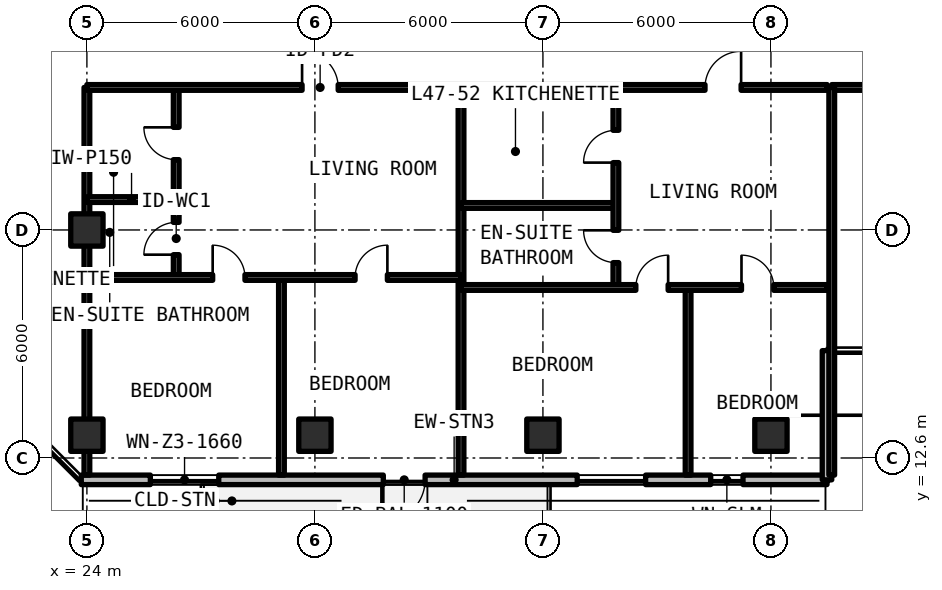
"""IFC4 building model, lengths in metres.
Left out: names, types, materials, properties, quantities, classifications, styles, units other than length and angle.
Written with IfcOpenShell. Run it as: python <this file> out.ifc"""

import sys

from ifc_helpers import new_model, si_unit, direction, frame, frame_2d, origin, origin_2d, place, context, subcontext, project, spatial, rectangle, extrude, element, fill, save


model = new_model("IFC4")
c1 = context("Model", 3, precision=1e-05, world=origin(), true_north=direction((0.0, 1.0)))
c2 = subcontext(c1, "Body", "Model", "MODEL_VIEW")
j1 = project(units=[si_unit("LENGTHUNIT", "METRE"), si_unit("PLANEANGLEUNIT", "RADIAN")], contexts=[c1])
p1 = place(None, origin())
s1 = spatial("IfcSite", under=j1, at=p1, CompositionType="ELEMENT")
p2 = place(p1, origin())
s2 = spatial("IfcBuilding", under=s1, at=p2, CompositionType="ELEMENT")
p3 = place(p2, frame((0.0, 0.0, 169.29)))
s3 = spatial("IfcBuildingStorey", under=s2, at=p3, CompositionType="ELEMENT", Elevation=169.29)
for number, where, z_axis, x_axis in (
    (1, (24.0, 18.6, 0.0), (0.0, 0.0, 1.0), (1.0, 0.0, 0.0)),
    (2, (24.0, 13.2, 0.0), (0.0, 0.0, 1.0), (1.0, 0.0, 0.0)),
    (3, (30.0, 13.2, 0.0), (0.0, 0.0, 1.0), (1.0, 0.0, 0.0)),
    (4, (36.0, 13.2, 0.0), (0.0, 0.0, 1.0), (1.0, 0.0, 0.0)),
    (5, (42.0, 13.2, 0.0), (0.0, 0.0, 1.0), (1.0, 0.0, 0.0)),
):
    element("IfcColumn", number, at=place(p3, frame(where, z_axis=z_axis, x_axis=x_axis)), inside=s3, PredefinedType="COLUMN", context=c2, shape_type="SweptSolid", body=[
        extrude(rectangle(XDim=0.85, YDim=0.85, at=origin_2d()), origin(), (0.0, 0.0, 1.0), 3.63),
    ])
p4 = place(p3, frame((23.852, 12.025, 0.0), z_axis=(0.0, 0.0, 1.0), x_axis=(1.0, 0.0, 0.0)))
e6 = element("IfcWall", 6, at=p4, inside=s3, PredefinedType="SOLIDWALL", context=c2, shape_type="SweptSolid", body=[
    extrude(rectangle(XDim=19.623, YDim=0.25, at=frame_2d((9.812, 0.0))), origin(), (0.0, 0.0, 1.0), 3.35),
])
p5 = place(p4, frame((7.948, 0.0, 0.0)))
e7 = element("IfcOpeningElement", 7, at=p5, cuts=e6, PredefinedType="OPENING", context=c2, shape_type="SweptSolid", body=[
    extrude(rectangle(XDim=1.1, YDim=2.15, at=frame_2d((0.55, 1.075))), frame((0.0, 0.135, 0.0), z_axis=(0.0, -1.0, 0.0), x_axis=(1.0, 0.0, 0.0)), (0.0, 0.0, 1.0), 0.27),
])
p6 = place(p4, frame((1.818, 0.0, 0.78)))
e8 = element("IfcOpeningElement", 8, at=p6, cuts=e6, PredefinedType="OPENING", context=c2, shape_type="SweptSolid", body=[
    extrude(rectangle(XDim=1.8, YDim=1.66, at=frame_2d((0.9, 0.83))), frame((0.0, 0.135, 0.0), z_axis=(0.0, -1.0, 0.0), x_axis=(1.0, 0.0, 0.0)), (0.0, 0.0, 1.0), 0.27),
])
p7 = place(p4, frame((13.051, 0.0, 0.78)))
e9 = element("IfcOpeningElement", 9, at=p7, cuts=e6, PredefinedType="OPENING", context=c2, shape_type="SweptSolid", body=[
    extrude(rectangle(XDim=1.8, YDim=1.66, at=frame_2d((0.9, 0.83))), frame((0.0, 0.135, 0.0), z_axis=(0.0, -1.0, 0.0), x_axis=(1.0, 0.0, 0.0)), (0.0, 0.0, 1.0), 0.27),
])
p8 = place(p4, frame((16.563, 0.0, 0.78)))
e10 = element("IfcOpeningElement", 10, at=p8, cuts=e6, PredefinedType="OPENING", context=c2, shape_type="SweptSolid", body=[
    extrude(rectangle(XDim=0.85, YDim=1.65, at=frame_2d((0.425, 0.825))), frame((0.0, 0.135, 0.0), z_axis=(0.0, -1.0, 0.0), x_axis=(1.0, 0.0, 0.0)), (0.0, 0.0, 1.0), 0.27),
])
p9 = place(p3, frame((43.475, 12.025, 0.0), z_axis=(0.0, 0.0, 1.0), x_axis=(0.0, 1.0, 0.0)))
e11 = element("IfcWall", 11, at=p9, inside=s3, PredefinedType="SOLIDWALL", context=c2, shape_type="SweptSolid", body=[
    extrude(rectangle(XDim=3.4, YDim=0.25, at=frame_2d((1.7, 0.0))), origin(), (0.0, 0.0, 1.0), 3.35),
])
p10 = place(p3, frame((43.6, 22.35, 0.0), z_axis=(0.0, 0.0, 1.0), x_axis=(1.0, 0.0, 0.0)))
e12 = element("IfcWall", 12, at=p10, inside=s3, PredefinedType="SOLIDWALL", context=c2, shape_type="SweptSolid", body=[
    extrude(rectangle(XDim=8.4, YDim=0.15, at=frame_2d((4.2, 0.0))), origin(), (0.0, 0.0, 1.0), 2.57),
])
p11 = place(p10, frame((3.65, 0.0, 0.0)))
e13 = element("IfcOpeningElement", 13, at=p11, cuts=e12, PredefinedType="OPENING", context=c2, shape_type="SweptSolid", body=[
    extrude(rectangle(XDim=1.1, YDim=2.15, at=frame_2d((0.55, 1.075))), frame((0.0, 0.085, 0.0), z_axis=(0.0, -1.0, 0.0), x_axis=(1.0, 0.0, 0.0)), (0.0, 0.0, 1.0), 0.17),
])
for number, where, z_axis, x_axis in (
    (14, (43.6, 12.15, 0.0), (0.0, 0.0, 1.0), (0.0, 1.0, 0.0)),
    (15, (24.0, 12.15, 0.0), (0.0, 0.0, 1.0), (0.0, 1.0, 0.0)),
    (16, (33.845, 12.15, 0.0), (0.0, 0.0, 1.0), (0.0, 1.0, 0.0)),
):
    element("IfcWall", number, at=place(p3, frame(where, z_axis=z_axis, x_axis=x_axis)), inside=s3, PredefinedType="SOLIDWALL", context=c2, shape_type="SweptSolid", body=[
        extrude(rectangle(XDim=10.2, YDim=0.15, at=frame_2d((5.1, 0.0))), origin(), (0.0, 0.0, 1.0), 2.57),
    ])
p12 = place(p3, frame((24.0, 19.4, 0.0), z_axis=(0.0, 0.0, 1.0), x_axis=(1.0, 0.0, 0.0)))
e17 = element("IfcWall", 17, at=p12, inside=s3, PredefinedType="PARTITIONING", context=c2, shape_type="SweptSolid", body=[
    extrude(rectangle(XDim=2.35, YDim=0.15, at=frame_2d((1.175, 0.0))), origin(), (0.0, 0.0, 1.0), 2.57),
])
p13 = place(p3, frame((26.35, 17.35, 0.0), z_axis=(0.0, 0.0, 1.0), x_axis=(0.0, 1.0, 0.0)))
e18 = element("IfcWall", 18, at=p13, inside=s3, PredefinedType="PARTITIONING", context=c2, shape_type="SweptSolid", body=[
    extrude(rectangle(XDim=5.0, YDim=0.15, at=frame_2d((2.5, 0.0))), origin(), (0.0, 0.0, 1.0), 2.57),
])
p14 = place(p13, frame((0.6, 0.0, 0.0)))
e19 = element("IfcOpeningElement", 19, at=p14, cuts=e18, PredefinedType="OPENING", context=c2, shape_type="SweptSolid", body=[
    extrude(rectangle(XDim=0.85, YDim=2.1, at=frame_2d((0.425, 1.05))), frame((0.0, 0.085, 0.0), z_axis=(0.0, -1.0, 0.0), x_axis=(1.0, 0.0, 0.0)), (0.0, 0.0, 1.0), 0.17),
])
p15 = place(p13, frame((3.1, 0.0, 0.0)))
e20 = element("IfcOpeningElement", 20, at=p15, cuts=e18, PredefinedType="OPENING", context=c2, shape_type="SweptSolid", body=[
    extrude(rectangle(XDim=0.85, YDim=2.1, at=frame_2d((0.425, 1.05))), frame((0.0, 0.085, 0.0), z_axis=(0.0, -1.0, 0.0), x_axis=(1.0, 0.0, 0.0)), (0.0, 0.0, 1.0), 0.17),
])
p16 = place(p3, frame((29.119, 12.15, 0.0), z_axis=(0.0, 0.0, 1.0), x_axis=(0.0, 1.0, 0.0)))
e21 = element("IfcWall", 21, at=p16, inside=s3, PredefinedType="PARTITIONING", context=c2, shape_type="SweptSolid", body=[
    extrude(rectangle(XDim=5.2, YDim=0.15, at=frame_2d((2.6, 0.0))), origin(), (0.0, 0.0, 1.0), 2.57),
])
p17 = place(p3, frame((24.0, 17.35, 0.0), z_axis=(0.0, 0.0, 1.0), x_axis=(1.0, 0.0, 0.0)))
e22 = element("IfcWall", 22, at=p17, inside=s3, PredefinedType="PARTITIONING", context=c2, shape_type="SweptSolid", body=[
    extrude(rectangle(XDim=9.845, YDim=0.15, at=frame_2d((4.922, 0.0))), origin(), (0.0, 0.0, 1.0), 2.57),
])
p18 = place(p17, frame((3.31, 0.0, 0.0)))
e23 = element("IfcOpeningElement", 23, at=p18, cuts=e22, PredefinedType="OPENING", context=c2, shape_type="SweptSolid", body=[
    extrude(rectangle(XDim=0.85, YDim=2.1, at=frame_2d((0.425, 1.05))), frame((0.0, 0.085, 0.0), z_axis=(0.0, -1.0, 0.0), x_axis=(1.0, 0.0, 0.0)), (0.0, 0.0, 1.0), 0.17),
])
p19 = place(p17, frame((7.057, 0.0, 0.0)))
e24 = element("IfcOpeningElement", 24, at=p19, cuts=e22, PredefinedType="OPENING", context=c2, shape_type="SweptSolid", body=[
    extrude(rectangle(XDim=0.85, YDim=2.1, at=frame_2d((0.425, 1.05))), frame((0.0, 0.085, 0.0), z_axis=(0.0, -1.0, 0.0), x_axis=(1.0, 0.0, 0.0)), (0.0, 0.0, 1.0), 0.17),
])
p20 = place(p3, frame((24.0, 22.35, 0.0), z_axis=(0.0, 0.0, 1.0), x_axis=(1.0, 0.0, 0.0)))
e25 = element("IfcWall", 25, at=p20, inside=s3, PredefinedType="SOLIDWALL", context=c2, shape_type="SweptSolid", body=[
    extrude(rectangle(XDim=9.845, YDim=0.15, at=frame_2d((4.922, 0.0))), origin(), (0.0, 0.0, 1.0), 2.57),
])
p21 = place(p20, frame((5.662, 0.0, 0.0)))
e26 = element("IfcOpeningElement", 26, at=p21, cuts=e25, PredefinedType="OPENING", context=c2, shape_type="SweptSolid", body=[
    extrude(rectangle(XDim=0.95, YDim=2.15, at=frame_2d((0.475, 1.075))), frame((0.0, 0.085, 0.0), z_axis=(0.0, -1.0, 0.0), x_axis=(1.0, 0.0, 0.0)), (0.0, 0.0, 1.0), 0.17),
])
p22 = place(p3, frame((33.845, 19.245, 0.0), z_axis=(0.0, 0.0, 1.0), x_axis=(1.0, 0.0, 0.0)))
e27 = element("IfcWall", 27, at=p22, inside=s3, PredefinedType="PARTITIONING", context=c2, shape_type="SweptSolid", body=[
    extrude(rectangle(XDim=4.075, YDim=0.15, at=frame_2d((2.038, 0.0))), origin(), (0.0, 0.0, 1.0), 2.57),
])
p23 = place(p3, frame((37.92, 17.087, 0.0), z_axis=(0.0, 0.0, 1.0), x_axis=(0.0, 1.0, 0.0)))
e28 = element("IfcWall", 28, at=p23, inside=s3, PredefinedType="PARTITIONING", context=c2, shape_type="SweptSolid", body=[
    extrude(rectangle(XDim=5.263, YDim=0.15, at=frame_2d((2.632, 0.0))), origin(), (0.0, 0.0, 1.0), 2.57),
])
p24 = place(p23, frame((0.654, 0.0, 0.0)))
e29 = element("IfcOpeningElement", 29, at=p24, cuts=e28, PredefinedType="OPENING", context=c2, shape_type="SweptSolid", body=[
    extrude(rectangle(XDim=0.85, YDim=2.1, at=frame_2d((0.425, 1.05))), frame((0.0, 0.085, 0.0), z_axis=(0.0, -1.0, 0.0), x_axis=(1.0, 0.0, 0.0)), (0.0, 0.0, 1.0), 0.17),
])
p25 = place(p23, frame((3.285, 0.0, 0.0)))
e30 = element("IfcOpeningElement", 30, at=p25, cuts=e28, PredefinedType="OPENING", context=c2, shape_type="SweptSolid", body=[
    extrude(rectangle(XDim=0.85, YDim=2.1, at=frame_2d((0.425, 1.05))), frame((0.0, 0.085, 0.0), z_axis=(0.0, -1.0, 0.0), x_axis=(1.0, 0.0, 0.0)), (0.0, 0.0, 1.0), 0.17),
])
p26 = place(p3, frame((39.82, 12.15, 0.0), z_axis=(0.0, 0.0, 1.0), x_axis=(0.0, 1.0, 0.0)))
e31 = element("IfcWall", 31, at=p26, inside=s3, PredefinedType="PARTITIONING", context=c2, shape_type="SweptSolid", body=[
    extrude(rectangle(XDim=4.937, YDim=0.15, at=frame_2d((2.469, 0.0))), origin(), (0.0, 0.0, 1.0), 2.57),
])
p27 = place(p3, frame((33.845, 17.087, 0.0), z_axis=(0.0, 0.0, 1.0), x_axis=(1.0, 0.0, 0.0)))
e32 = element("IfcWall", 32, at=p27, inside=s3, PredefinedType="PARTITIONING", context=c2, shape_type="SweptSolid", body=[
    extrude(rectangle(XDim=9.635, YDim=0.15, at=frame_2d((4.818, 0.0))), origin(), (0.0, 0.0, 1.0), 2.57),
])
p28 = place(p27, frame((4.6, 0.0, 0.0)))
e33 = element("IfcOpeningElement", 33, at=p28, cuts=e32, PredefinedType="OPENING", context=c2, shape_type="SweptSolid", body=[
    extrude(rectangle(XDim=0.85, YDim=2.1, at=frame_2d((0.425, 1.05))), frame((0.0, 0.085, 0.0), z_axis=(0.0, -1.0, 0.0), x_axis=(1.0, 0.0, 0.0)), (0.0, 0.0, 1.0), 0.17),
])
p29 = place(p27, frame((7.38, 0.0, 0.0)))
e34 = element("IfcOpeningElement", 34, at=p29, cuts=e32, PredefinedType="OPENING", context=c2, shape_type="SweptSolid", body=[
    extrude(rectangle(XDim=0.85, YDim=2.1, at=frame_2d((0.425, 1.05))), frame((0.0, 0.085, 0.0), z_axis=(0.0, -1.0, 0.0), x_axis=(1.0, 0.0, 0.0)), (0.0, 0.0, 1.0), 0.17),
])
p30 = place(p3, frame((33.845, 22.35, 0.0), z_axis=(0.0, 0.0, 1.0), x_axis=(1.0, 0.0, 0.0)))
e35 = element("IfcWall", 35, at=p30, inside=s3, PredefinedType="SOLIDWALL", context=c2, shape_type="SweptSolid", body=[
    extrude(rectangle(XDim=9.635, YDim=0.15, at=frame_2d((4.818, 0.0))), origin(), (0.0, 0.0, 1.0), 2.57),
])
p31 = place(p30, frame((6.42, 0.0, 0.0)))
e36 = element("IfcOpeningElement", 36, at=p31, cuts=e35, PredefinedType="OPENING", context=c2, shape_type="SweptSolid", body=[
    extrude(rectangle(XDim=0.95, YDim=2.15, at=frame_2d((0.475, 1.075))), frame((0.0, 0.085, 0.0), z_axis=(0.0, -1.0, 0.0), x_axis=(1.0, 0.0, 0.0)), (0.0, 0.0, 1.0), 0.17),
])
p32 = place(p5, frame((1.1, 0.0, 0.0), z_axis=(0.0, 0.0, 1.0), x_axis=(-1.0, 0.0, 0.0)))
e37 = element("IfcDoor", 37, at=p32, inside=s3, OperationType="SINGLE_SWING_RIGHT", PredefinedType="DOOR", context=c2, shape_type="SweptSolid", body=[
    extrude(rectangle(XDim=1.1, YDim=2.15, at=frame_2d((0.55, 1.075))), frame((0.0, 0.025, 0.0), z_axis=(0.0, -1.0, 0.0), x_axis=(1.0, 0.0, 0.0)), (0.0, 0.0, 1.0), 0.05),
])
fill(e7, e37)
p33 = place(p6, origin())
e38 = element("IfcWindow", 38, at=p33, inside=s3, PartitioningType="SINGLE_PANEL", PredefinedType="WINDOW", context=c2, shape_type="SweptSolid", body=[
    extrude(rectangle(XDim=1.8, YDim=1.66, at=frame_2d((0.9, 0.83))), frame((0.0, 0.03, 0.0), z_axis=(0.0, -1.0, 0.0), x_axis=(1.0, 0.0, 0.0)), (0.0, 0.0, 1.0), 0.06),
])
fill(e8, e38)
p34 = place(p7, origin())
e39 = element("IfcWindow", 39, at=p34, inside=s3, PartitioningType="SINGLE_PANEL", PredefinedType="WINDOW", context=c2, shape_type="SweptSolid", body=[
    extrude(rectangle(XDim=1.8, YDim=1.66, at=frame_2d((0.9, 0.83))), frame((0.0, 0.03, 0.0), z_axis=(0.0, -1.0, 0.0), x_axis=(1.0, 0.0, 0.0)), (0.0, 0.0, 1.0), 0.06),
])
fill(e9, e39)
p35 = place(p8, origin())
e40 = element("IfcWindow", 40, at=p35, inside=s3, PartitioningType="SINGLE_PANEL", PredefinedType="WINDOW", context=c2, shape_type="SweptSolid", body=[
    extrude(rectangle(XDim=0.85, YDim=1.65, at=frame_2d((0.425, 0.825))), frame((0.0, 0.03, 0.0), z_axis=(0.0, -1.0, 0.0), x_axis=(1.0, 0.0, 0.0)), (0.0, 0.0, 1.0), 0.06),
])
fill(e10, e40)
p36 = place(p14, origin())
e41 = element("IfcDoor", 41, at=p36, inside=s3, OperationType="SINGLE_SWING_LEFT", PredefinedType="DOOR", context=c2, shape_type="SweptSolid", body=[
    extrude(rectangle(XDim=0.85, YDim=2.1, at=frame_2d((0.425, 1.05))), frame((0.0, 0.025, 0.0), z_axis=(0.0, -1.0, 0.0), x_axis=(1.0, 0.0, 0.0)), (0.0, 0.0, 1.0), 0.05),
])
fill(e19, e41)
p37 = place(p15, origin())
e42 = element("IfcDoor", 42, at=p37, inside=s3, OperationType="SINGLE_SWING_RIGHT", PredefinedType="DOOR", context=c2, shape_type="SweptSolid", body=[
    extrude(rectangle(XDim=0.85, YDim=2.1, at=frame_2d((0.425, 1.05))), frame((0.0, 0.025, 0.0), z_axis=(0.0, -1.0, 0.0), x_axis=(1.0, 0.0, 0.0)), (0.0, 0.0, 1.0), 0.05),
])
fill(e20, e42)
p38 = place(p18, origin())
e43 = element("IfcDoor", 43, at=p38, inside=s3, OperationType="SINGLE_SWING_LEFT", PredefinedType="DOOR", context=c2, shape_type="SweptSolid", body=[
    extrude(rectangle(XDim=0.85, YDim=2.1, at=frame_2d((0.425, 1.05))), frame((0.0, 0.025, 0.0), z_axis=(0.0, -1.0, 0.0), x_axis=(1.0, 0.0, 0.0)), (0.0, 0.0, 1.0), 0.05),
])
fill(e23, e43)
p39 = place(p19, origin())
e44 = element("IfcDoor", 44, at=p39, inside=s3, OperationType="SINGLE_SWING_RIGHT", PredefinedType="DOOR", context=c2, shape_type="SweptSolid", body=[
    extrude(rectangle(XDim=0.85, YDim=2.1, at=frame_2d((0.425, 1.05))), frame((0.0, 0.025, 0.0), z_axis=(0.0, -1.0, 0.0), x_axis=(1.0, 0.0, 0.0)), (0.0, 0.0, 1.0), 0.05),
])
fill(e24, e44)
p40 = place(p21, origin())
e45 = element("IfcDoor", 45, at=p40, inside=s3, OperationType="SINGLE_SWING_LEFT", PredefinedType="DOOR", context=c2, shape_type="SweptSolid", body=[
    extrude(rectangle(XDim=0.95, YDim=2.15, at=frame_2d((0.475, 1.075))), frame((0.0, 0.025, 0.0), z_axis=(0.0, -1.0, 0.0), x_axis=(1.0, 0.0, 0.0)), (0.0, 0.0, 1.0), 0.05),
])
fill(e26, e45)
p41 = place(p24, origin())
e46 = element("IfcDoor", 46, at=p41, inside=s3, OperationType="SINGLE_SWING_RIGHT", PredefinedType="DOOR", context=c2, shape_type="SweptSolid", body=[
    extrude(rectangle(XDim=0.85, YDim=2.1, at=frame_2d((0.425, 1.05))), frame((0.0, 0.025, 0.0), z_axis=(0.0, -1.0, 0.0), x_axis=(1.0, 0.0, 0.0)), (0.0, 0.0, 1.0), 0.05),
])
fill(e29, e46)
p42 = place(p25, origin())
e47 = element("IfcDoor", 47, at=p42, inside=s3, OperationType="SINGLE_SWING_LEFT", PredefinedType="DOOR", context=c2, shape_type="SweptSolid", body=[
    extrude(rectangle(XDim=0.85, YDim=2.1, at=frame_2d((0.425, 1.05))), frame((0.0, 0.025, 0.0), z_axis=(0.0, -1.0, 0.0), x_axis=(1.0, 0.0, 0.0)), (0.0, 0.0, 1.0), 0.05),
])
fill(e30, e47)
p43 = place(p28, origin())
e48 = element("IfcDoor", 48, at=p43, inside=s3, OperationType="SINGLE_SWING_RIGHT", PredefinedType="DOOR", context=c2, shape_type="SweptSolid", body=[
    extrude(rectangle(XDim=0.85, YDim=2.1, at=frame_2d((0.425, 1.05))), frame((0.0, 0.025, 0.0), z_axis=(0.0, -1.0, 0.0), x_axis=(1.0, 0.0, 0.0)), (0.0, 0.0, 1.0), 0.05),
])
fill(e33, e48)
p44 = place(p29, origin())
e49 = element("IfcDoor", 49, at=p44, inside=s3, OperationType="SINGLE_SWING_LEFT", PredefinedType="DOOR", context=c2, shape_type="SweptSolid", body=[
    extrude(rectangle(XDim=0.85, YDim=2.1, at=frame_2d((0.425, 1.05))), frame((0.0, 0.025, 0.0), z_axis=(0.0, -1.0, 0.0), x_axis=(1.0, 0.0, 0.0)), (0.0, 0.0, 1.0), 0.05),
])
fill(e34, e49)
p45 = place(p31, origin())
e50 = element("IfcDoor", 50, at=p45, inside=s3, OperationType="SINGLE_SWING_RIGHT", PredefinedType="DOOR", context=c2, shape_type="SweptSolid", body=[
    extrude(rectangle(XDim=0.95, YDim=2.15, at=frame_2d((0.475, 1.075))), frame((0.0, 0.025, 0.0), z_axis=(0.0, -1.0, 0.0), x_axis=(1.0, 0.0, 0.0)), (0.0, 0.0, 1.0), 0.05),
])
fill(e36, e50)
save(model, sys.argv[1])
